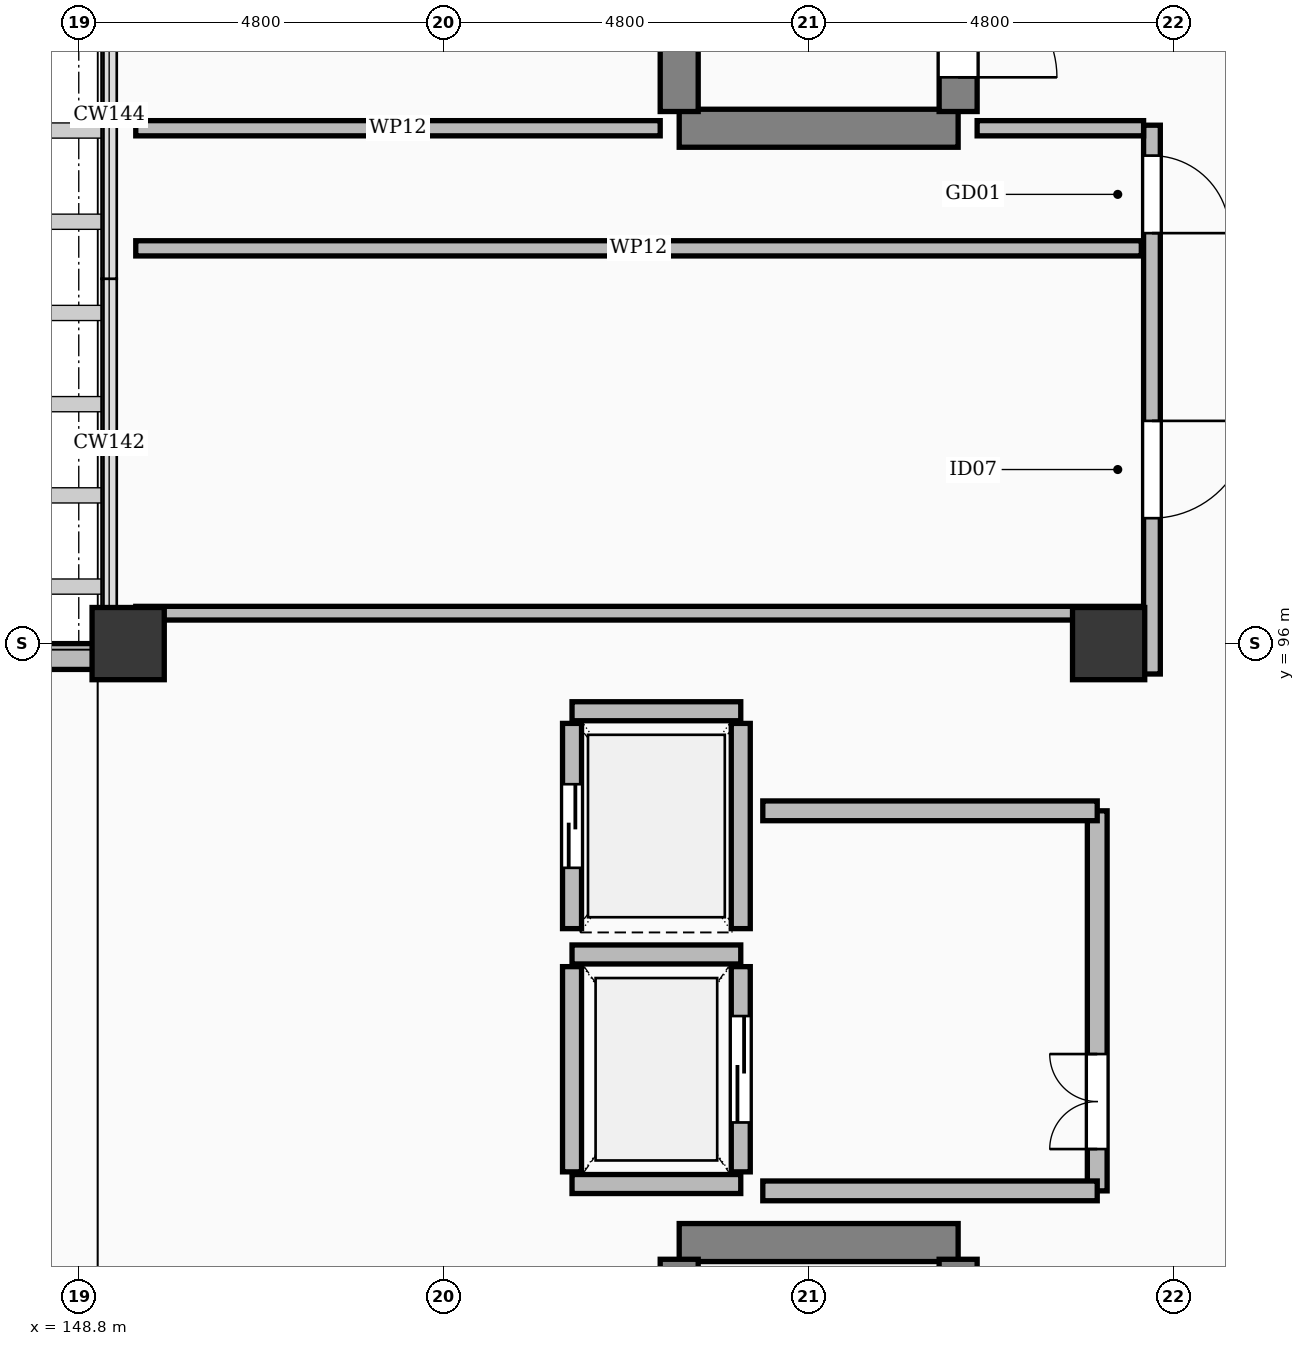
"""IFC4 building model, lengths in metres.
Left out: names, types, materials, properties, quantities, classifications, styles, units other than length and angle.
Written with IfcOpenShell. Run it as: python <this file> out.ifc"""

import sys

from ifc_helpers import new_model, si_unit, direction, frame, frame_2d, origin, origin_2d, place, context, subcontext, project, spatial, rectangle, extrude, element, fill, save


model = new_model("IFC4")
c1 = context("Model", 3, precision=1e-05, world=origin(), true_north=direction((0.0, 1.0)))
c2 = subcontext(c1, "Body", "Model", "MODEL_VIEW")
j1 = project(units=[si_unit("LENGTHUNIT", "METRE"), si_unit("PLANEANGLEUNIT", "RADIAN")], contexts=[c1])
p1 = place(None, origin())
s1 = spatial("IfcSite", under=j1, at=p1, CompositionType="ELEMENT")
p2 = place(p1, origin())
s2 = spatial("IfcBuilding", under=s1, at=p2, CompositionType="ELEMENT")
p3 = place(p2, frame((0.0, 0.0, 11.4)))
s3 = spatial("IfcBuildingStorey", under=s2, at=p3, CompositionType="ELEMENT", Elevation=11.4)
for number, where, z_axis, x_axis in (
    (1, (149.45, 96.0, 0.0), (0.0, 0.0, 1.0), (1.0, 0.0, 0.0)),
    (2, (162.35, 96.0, 0.0), (0.0, 0.0, 1.0), (1.0, 0.0, 0.0)),
):
    element("IfcColumn", number, at=place(p3, frame(where, z_axis=z_axis, x_axis=x_axis)), inside=s3, PredefinedType="COLUMN", context=c2, shape_type="SweptSolid", body=[
        extrude(rectangle(XDim=0.95, YDim=0.95, at=origin_2d()), origin(), (0.0, 0.0, 1.0), 4.8),
    ])
p4 = place(p3, frame((144.325, 95.83, 0.0), z_axis=(0.0, 0.0, 1.0), x_axis=(1.0, 0.0, 0.0)))
e3 = element("IfcWall", 3, at=p4, inside=s3, PredefinedType="SOLIDWALL", context=c2, shape_type="SweptSolid", body=[
    extrude(rectangle(XDim=4.675, YDim=0.34, at=frame_2d((2.337, 0.0))), origin(), (0.0, 0.0, 1.0), 4.42),
])
p5 = place(p3, frame((156.7, 88.12, 0.0), z_axis=(0.0, 0.0, 1.0), x_axis=(1.0, 0.0, 0.0)))
e4 = element("IfcWall", 4, at=p5, inside=s3, PredefinedType="SHEAR", context=c2, shape_type="SweptSolid", body=[
    extrude(rectangle(XDim=3.67, YDim=0.5, at=frame_2d((1.835, 0.0))), origin(), (0.0, 0.0, 1.0), 4.42),
])
p6 = place(p3, frame((156.7, 77.4, 0.0), z_axis=(0.0, 0.0, 1.0), x_axis=(0.0, 1.0, 0.0)))
e5 = element("IfcWall", 5, at=p6, inside=s3, PredefinedType="SHEAR", context=c2, shape_type="SweptSolid", body=[
    extrude(rectangle(XDim=10.5, YDim=0.5, at=frame_2d((5.25, 0.0))), origin(), (0.0, 0.0, 1.0), 4.42),
])
p7 = place(p3, frame((160.37, 77.4, 0.0), z_axis=(0.0, 0.0, 1.0), x_axis=(0.0, 1.0, 0.0)))
e6 = element("IfcWall", 6, at=p7, inside=s3, PredefinedType="SHEAR", context=c2, shape_type="SweptSolid", body=[
    extrude(rectangle(XDim=10.5, YDim=0.5, at=frame_2d((5.25, 0.0))), origin(), (0.0, 0.0, 1.0), 4.42),
])
p8 = place(p7, frame((0.45, 0.0, 0.0)))
e7 = element("IfcOpeningElement", 7, at=p8, cuts=e6, PredefinedType="OPENING", context=c2, shape_type="SweptSolid", body=[
    extrude(rectangle(XDim=1.3, YDim=2.15, at=frame_2d((0.65, 1.075))), frame((0.0, 0.262, 0.0), z_axis=(0.0, -1.0, 0.0), x_axis=(1.0, 0.0, 0.0)), (0.0, 0.0, 1.0), 0.524),
])
for number, where, z_axis, x_axis in (
    (8, (155.29, 88.89, 0.0), (0.0, 0.0, 1.0), (1.0, 0.0, 0.0)),
    (9, (155.29, 91.91, 0.0), (0.0, 0.0, 1.0), (1.0, 0.0, 0.0)),
):
    element("IfcWall", number, at=place(p3, frame(where, z_axis=z_axis, x_axis=x_axis)), inside=s3, PredefinedType="SOLIDWALL", context=c2, shape_type="SweptSolid", body=[
        extrude(rectangle(XDim=2.22, YDim=0.25, at=frame_2d((1.11, 0.0))), origin(), (0.0, 0.0, 1.0), 4.42),
    ])
p9 = place(p3, frame((155.29, 89.05, 0.0), z_axis=(0.0, 0.0, 1.0), x_axis=(0.0, 1.0, 0.0)))
e10 = element("IfcWall", 10, at=p9, inside=s3, PredefinedType="SOLIDWALL", context=c2, shape_type="SweptSolid", body=[
    extrude(rectangle(XDim=2.7, YDim=0.25, at=frame_2d((1.35, 0.0))), origin(), (0.0, 0.0, 1.0), 4.42),
])
p10 = place(p3, frame((157.51, 89.05, 0.0), z_axis=(0.0, 0.0, 1.0), x_axis=(0.0, 1.0, 0.0)))
e11 = element("IfcWall", 11, at=p10, inside=s3, PredefinedType="SOLIDWALL", context=c2, shape_type="SweptSolid", body=[
    extrude(rectangle(XDim=2.7, YDim=0.25, at=frame_2d((1.35, 0.0))), origin(), (0.0, 0.0, 1.0), 4.42),
])
p11 = place(p10, frame((0.65, 0.0, 0.0)))
e12 = element("IfcOpeningElement", 12, at=p11, cuts=e11, PredefinedType="OPENING", context=c2, shape_type="SweptSolid", body=[
    extrude(rectangle(XDim=1.4, YDim=2.3, at=frame_2d((0.7, 1.15))), frame((0.0, 0.137, 0.0), z_axis=(0.0, -1.0, 0.0), x_axis=(1.0, 0.0, 0.0)), (0.0, 0.0, 1.0), 0.274),
])
p12 = place(p3, frame((155.29, 95.11, 0.0), z_axis=(0.0, 0.0, 1.0), x_axis=(1.0, 0.0, 0.0)))
e13 = element("IfcWall", 13, at=p12, inside=s3, PredefinedType="SOLIDWALL", context=c2, shape_type="SweptSolid", body=[
    extrude(rectangle(XDim=2.22, YDim=0.25, at=frame_2d((1.11, 0.0))), origin(), (0.0, 0.0, 1.0), 4.42),
])
p13 = place(p3, frame((155.29, 92.25, 0.0), z_axis=(0.0, 0.0, 1.0), x_axis=(0.0, 1.0, 0.0)))
e14 = element("IfcWall", 14, at=p13, inside=s3, PredefinedType="SOLIDWALL", context=c2, shape_type="SweptSolid", body=[
    extrude(rectangle(XDim=2.7, YDim=0.25, at=frame_2d((1.35, 0.0))), origin(), (0.0, 0.0, 1.0), 4.42),
])
p14 = place(p13, frame((0.8, 0.0, 0.0)))
e15 = element("IfcOpeningElement", 15, at=p14, cuts=e14, PredefinedType="OPENING", context=c2, shape_type="SweptSolid", body=[
    extrude(rectangle(XDim=1.1, YDim=2.2, at=frame_2d((0.55, 1.1))), frame((0.0, 0.137, 0.0), z_axis=(0.0, -1.0, 0.0), x_axis=(1.0, 0.0, 0.0)), (0.0, 0.0, 1.0), 0.274),
])
p15 = place(p3, frame((157.51, 92.25, 0.0), z_axis=(0.0, 0.0, 1.0), x_axis=(0.0, 1.0, 0.0)))
e16 = element("IfcWall", 16, at=p15, inside=s3, PredefinedType="SOLIDWALL", context=c2, shape_type="SweptSolid", body=[
    extrude(rectangle(XDim=2.7, YDim=0.25, at=frame_2d((1.35, 0.0))), origin(), (0.0, 0.0, 1.0), 4.42),
])
p16 = place(p3, frame((162.2, 88.8, 0.0), z_axis=(0.0, 0.0, 1.0), x_axis=(0.0, 1.0, 0.0)))
e17 = element("IfcWall", 17, at=p16, inside=s3, PredefinedType="SOLIDWALL", context=c2, shape_type="SweptSolid", body=[
    extrude(rectangle(XDim=5.0, YDim=0.26, at=frame_2d((2.5, 0.0))), origin(), (0.0, 0.0, 1.0), 3.692),
])
p17 = place(p16, frame((0.55, 0.0, 0.0)))
e18 = element("IfcOpeningElement", 18, at=p17, cuts=e17, PredefinedType="OPENING", context=c2, shape_type="SweptSolid", body=[
    extrude(rectangle(XDim=1.25, YDim=2.15, at=frame_2d((0.625, 1.075))), frame((0.0, 0.142, 0.0), z_axis=(0.0, -1.0, 0.0), x_axis=(1.0, 0.0, 0.0)), (0.0, 0.0, 1.0), 0.284),
])
for number, where, z_axis, x_axis in (
    (19, (157.8, 88.8, 0.0), (0.0, 0.0, 1.0), (1.0, 0.0, 0.0)),
    (20, (157.8, 93.8, 0.0), (0.0, 0.0, 1.0), (1.0, 0.0, 0.0)),
):
    element("IfcWall", number, at=place(p3, frame(where, z_axis=z_axis, x_axis=x_axis)), inside=s3, PredefinedType="SOLIDWALL", context=c2, shape_type="SweptSolid", body=[
        extrude(rectangle(XDim=4.4, YDim=0.26, at=frame_2d((2.2, 0.0))), origin(), (0.0, 0.0, 1.0), 3.692),
    ])
p18 = place(p3, frame((156.7, 102.78, 0.0), z_axis=(0.0, 0.0, 1.0), x_axis=(1.0, 0.0, 0.0)))
e21 = element("IfcWall", 21, at=p18, inside=s3, PredefinedType="SHEAR", context=c2, shape_type="SweptSolid", body=[
    extrude(rectangle(XDim=3.67, YDim=0.5, at=frame_2d((1.835, 0.0))), origin(), (0.0, 0.0, 1.0), 4.42),
])
p19 = place(p3, frame((156.7, 103.0, 0.0), z_axis=(0.0, 0.0, 1.0), x_axis=(0.0, 1.0, 0.0)))
e22 = element("IfcWall", 22, at=p19, inside=s3, PredefinedType="SHEAR", context=c2, shape_type="SweptSolid", body=[
    extrude(rectangle(XDim=10.5, YDim=0.5, at=frame_2d((5.25, 0.0))), origin(), (0.0, 0.0, 1.0), 4.42),
])
p20 = place(p3, frame((160.37, 103.0, 0.0), z_axis=(0.0, 0.0, 1.0), x_axis=(0.0, 1.0, 0.0)))
e23 = element("IfcWall", 23, at=p20, inside=s3, PredefinedType="SHEAR", context=c2, shape_type="SweptSolid", body=[
    extrude(rectangle(XDim=10.5, YDim=0.5, at=frame_2d((5.25, 0.0))), origin(), (0.0, 0.0, 1.0), 4.42),
])
p21 = place(p20, frame((0.45, 0.0, 0.0)))
e24 = element("IfcOpeningElement", 24, at=p21, cuts=e23, PredefinedType="OPENING", context=c2, shape_type="SweptSolid", body=[
    extrude(rectangle(XDim=1.3, YDim=2.15, at=frame_2d((0.65, 1.075))), frame((0.0, 0.262, 0.0), z_axis=(0.0, -1.0, 0.0), x_axis=(1.0, 0.0, 0.0)), (0.0, 0.0, 1.0), 0.524),
])
p22 = place(p3, frame((162.92, 95.6, 0.0), z_axis=(0.0, 0.0, 1.0), x_axis=(0.0, 1.0, 0.0)))
e25 = element("IfcWall", 25, at=p22, inside=s3, PredefinedType="PARTITIONING", context=c2, shape_type="SweptSolid", body=[
    extrude(rectangle(XDim=7.22, YDim=0.22, at=frame_2d((3.61, 0.0))), origin(), (0.0, 0.0, 1.0), 3.692),
])
p23 = place(p22, frame((2.05, 0.0, 0.0)))
e26 = element("IfcOpeningElement", 26, at=p23, cuts=e25, PredefinedType="OPENING", context=c2, shape_type="SweptSolid", body=[
    extrude(rectangle(XDim=1.28, YDim=2.16, at=frame_2d((0.64, 1.08))), frame((0.0, 0.122, 0.0), z_axis=(0.0, -1.0, 0.0), x_axis=(1.0, 0.0, 0.0)), (0.0, 0.0, 1.0), 0.244),
])
p24 = place(p22, frame((5.8, 0.0, 0.0)))
e27 = element("IfcOpeningElement", 27, at=p24, cuts=e25, PredefinedType="OPENING", context=c2, shape_type="SweptSolid", body=[
    extrude(rectangle(XDim=1.02, YDim=2.2, at=frame_2d((0.51, 1.1))), frame((0.0, 0.122, 0.0), z_axis=(0.0, -1.0, 0.0), x_axis=(1.0, 0.0, 0.0)), (0.0, 0.0, 1.0), 0.244),
])
p25 = place(p3, frame((149.55, 96.4, 0.0), z_axis=(0.0, 0.0, 1.0), x_axis=(1.0, 0.0, 0.0)))
e28 = element("IfcWall", 28, at=p25, inside=s3, PredefinedType="PARTITIONING", context=c2, shape_type="SweptSolid", body=[
    extrude(rectangle(XDim=13.23, YDim=0.18, at=frame_2d((6.615, 0.0))), origin(), (0.0, 0.0, 1.0), 3.692),
])
p26 = place(p3, frame((149.55, 101.2, 0.0), z_axis=(0.0, 0.0, 1.0), x_axis=(1.0, 0.0, 0.0)))
e29 = element("IfcWall", 29, at=p26, inside=s3, PredefinedType="PARTITIONING", context=c2, shape_type="SweptSolid", body=[
    extrude(rectangle(XDim=13.23, YDim=0.2, at=frame_2d((6.615, 0.0))), origin(), (0.0, 0.0, 1.0), 3.692),
])
p27 = place(p3, frame((149.55, 102.78, 0.0), z_axis=(0.0, 0.0, 1.0), x_axis=(1.0, 0.0, 0.0)))
e30 = element("IfcWall", 30, at=p27, inside=s3, PredefinedType="PARTITIONING", context=c2, shape_type="SweptSolid", body=[
    extrude(rectangle(XDim=6.9, YDim=0.2, at=frame_2d((3.45, 0.0))), origin(), (0.0, 0.0, 1.0), 3.692),
])
p28 = place(p3, frame((160.62, 102.78, 0.0), z_axis=(0.0, 0.0, 1.0), x_axis=(1.0, 0.0, 0.0)))
e31 = element("IfcWall", 31, at=p28, inside=s3, PredefinedType="PARTITIONING", context=c2, shape_type="SweptSolid", body=[
    extrude(rectangle(XDim=2.19, YDim=0.2, at=frame_2d((1.095, 0.0))), origin(), (0.0, 0.0, 1.0), 3.692),
])
p29 = place(p11, origin())
e32 = element("IfcDoor", 32, at=p29, inside=s3, OperationType="SLIDING_TO_LEFT", PredefinedType="DOOR", context=c2, shape_type="SweptSolid", body=[
    extrude(rectangle(XDim=1.4, YDim=2.3, at=frame_2d((0.7, 1.15))), frame((0.0, 0.025, 0.0), z_axis=(0.0, -1.0, 0.0), x_axis=(1.0, 0.0, 0.0)), (0.0, 0.0, 1.0), 0.05),
])
fill(e12, e32)
p30 = place(p14, origin())
e33 = element("IfcDoor", 33, at=p30, inside=s3, OperationType="SLIDING_TO_LEFT", PredefinedType="DOOR", context=c2, shape_type="SweptSolid", body=[
    extrude(rectangle(XDim=1.1, YDim=2.2, at=frame_2d((0.55, 1.1))), frame((0.0, 0.025, 0.0), z_axis=(0.0, -1.0, 0.0), x_axis=(1.0, 0.0, 0.0)), (0.0, 0.0, 1.0), 0.05),
])
fill(e15, e33)
p31 = place(p17, origin())
e34 = element("IfcDoor", 34, at=p31, inside=s3, OperationType="DOUBLE_DOOR_SINGLE_SWING", PredefinedType="DOOR", context=c2, shape_type="SweptSolid", body=[
    extrude(rectangle(XDim=1.25, YDim=2.15, at=frame_2d((0.625, 1.075))), frame((0.0, 0.025, 0.0), z_axis=(0.0, -1.0, 0.0), x_axis=(1.0, 0.0, 0.0)), (0.0, 0.0, 1.0), 0.05),
])
fill(e18, e34)
p32 = place(p21, frame((1.3, 0.0, 0.0), z_axis=(0.0, 0.0, 1.0), x_axis=(-1.0, 0.0, 0.0)))
e35 = element("IfcDoor", 35, at=p32, inside=s3, OperationType="SINGLE_SWING_LEFT", PredefinedType="DOOR", context=c2, shape_type="SweptSolid", body=[
    extrude(rectangle(XDim=1.3, YDim=2.15, at=frame_2d((0.65, 1.075))), frame((0.0, 0.025, 0.0), z_axis=(0.0, -1.0, 0.0), x_axis=(1.0, 0.0, 0.0)), (0.0, 0.0, 1.0), 0.05),
])
fill(e24, e35)
p33 = place(p23, frame((1.28, 0.0, 0.0), z_axis=(0.0, 0.0, 1.0), x_axis=(-1.0, 0.0, 0.0)))
e36 = element("IfcDoor", 36, at=p33, inside=s3, OperationType="SINGLE_SWING_RIGHT", PredefinedType="DOOR", context=c2, shape_type="SweptSolid", body=[
    extrude(rectangle(XDim=1.28, YDim=2.16, at=frame_2d((0.64, 1.08))), frame((0.0, 0.025, 0.0), z_axis=(0.0, -1.0, 0.0), x_axis=(1.0, 0.0, 0.0)), (0.0, 0.0, 1.0), 0.05),
])
fill(e26, e36)
p34 = place(p24, frame((1.02, 0.0, 0.0), z_axis=(0.0, 0.0, 1.0), x_axis=(-1.0, 0.0, 0.0)))
e37 = element("IfcDoor", 37, at=p34, inside=s3, OperationType="SINGLE_SWING_LEFT", PredefinedType="DOOR", context=c2, shape_type="SweptSolid", body=[
    extrude(rectangle(XDim=1.02, YDim=2.2, at=frame_2d((0.51, 1.1))), frame((0.0, 0.025, 0.0), z_axis=(0.0, -1.0, 0.0), x_axis=(1.0, 0.0, 0.0)), (0.0, 0.0, 1.0), 0.05),
])
fill(e27, e37)
save(model, sys.argv[1])
